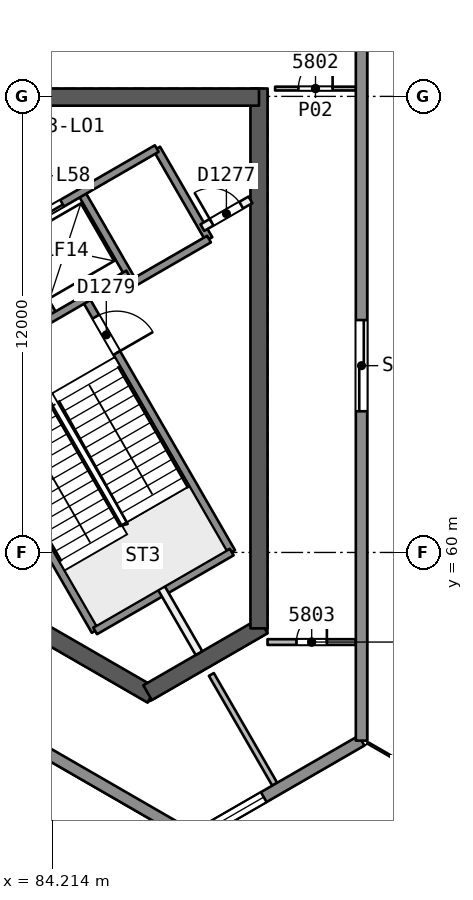
"""IFC4 building model, lengths in metres.
Left out: names, types, materials, properties, quantities, classifications, styles, units other than length and angle.
Written with IfcOpenShell. Run it as: python <this file> out.ifc"""

import sys

from ifc_helpers import new_model, si_unit, direction, frame, frame_2d, origin, origin_2d, place, context, subcontext, project, spatial, rectangle, extrude, element, fill, save


model = new_model("IFC4")
c1 = context("Model", 3, precision=1e-05, world=origin(), true_north=direction((0.0, 1.0)))
c2 = subcontext(c1, "Body", "Model", "MODEL_VIEW")
j1 = project(units=[si_unit("LENGTHUNIT", "METRE"), si_unit("PLANEANGLEUNIT", "RADIAN")], contexts=[c1])
p1 = place(None, origin())
s1 = spatial("IfcSite", under=j1, at=p1, CompositionType="ELEMENT")
p2 = place(p1, origin())
s2 = spatial("IfcBuilding", under=s1, at=p2, CompositionType="ELEMENT")
p3 = place(p2, frame((0.0, 0.0, 235.4)))
s3 = spatial("IfcBuildingStorey", under=s2, at=p3, CompositionType="ELEMENT", Elevation=235.4)
p4 = place(p3, frame((74.617, 63.299, 0.0), z_axis=(0.0, 0.0, 1.0), x_axis=(0.86602594008, -0.499999071108, 0.0)))
e1 = element("IfcWall", 1, at=p4, inside=s3, PredefinedType="SHEAR", context=c2, shape_type="SweptSolid", body=[
    extrude(rectangle(XDim=14.108, YDim=0.45, at=frame_2d((7.054, 0.0))), origin(), (0.0, 0.0, 1.0), 3.7),
])
p5 = place(p3, frame((86.723, 56.31, 0.0), z_axis=(0.0, 0.0, 1.0), x_axis=(0.866042179588, 0.49997094233, 0.0)))
e2 = element("IfcWall", 2, at=p5, inside=s3, PredefinedType="SHEAR", context=c2, shape_type="SweptSolid", body=[
    extrude(rectangle(XDim=3.515, YDim=0.45, at=frame_2d((1.758, 0.0))), origin(), (0.0, 0.0, 1.0), 3.7),
])
p6 = place(p3, frame((89.655, 58.002, 0.0), z_axis=(0.0, 0.0, 1.0), x_axis=(0.0, 1.0, 0.0)))
e3 = element("IfcWall", 3, at=p6, inside=s3, PredefinedType="SHEAR", context=c2, shape_type="SweptSolid", body=[
    extrude(rectangle(XDim=14.204, YDim=0.45, at=frame_2d((7.102, 0.0))), origin(), (0.0, 0.0, 1.0), 3.7),
])
p7 = place(p3, frame((89.655, 71.981, 0.0), z_axis=(0.0, 0.0, 1.0), x_axis=(-1.0, 0.0, 0.0)))
e4 = element("IfcWall", 4, at=p7, inside=s3, PredefinedType="SHEAR", context=c2, shape_type="SweptSolid", body=[
    extrude(rectangle(XDim=10.155, YDim=0.45, at=frame_2d((5.078, 0.0))), origin(), (0.0, 0.0, 1.0), 3.7),
])
p8 = place(p7, frame((8.005, 0.0, 0.0)))
e5 = element("IfcOpeningElement", 5, at=p8, cuts=e4, PredefinedType="OPENING", context=c2, shape_type="SweptSolid", body=[
    extrude(rectangle(XDim=1.2, YDim=2.1, at=frame_2d((0.6, 1.05))), frame((0.0, 0.235, 0.0), z_axis=(0.0, -1.0, 0.0), x_axis=(1.0, 0.0, 0.0)), (0.0, 0.0, 1.0), 0.471),
])
p9 = place(p3, frame((91.418, 51.564, 0.0), z_axis=(-0.017605841609, 0.030529980019, 0.999378784376), x_axis=(0.499244314507, -0.86574422845, 0.035242663615)))
e6 = element("IfcColumn", 6, at=p9, inside=s3, PredefinedType="COLUMN", context=c2, shape_type="SweptSolid", body=[
    extrude(rectangle(XDim=1.9, YDim=1.9, at=origin_2d()), origin(), (0.0, 0.0, 1.0), 3.702),
])
p10 = place(p3, frame((90.079, 72.206, 0.0), z_axis=(0.0, 0.0, 1.0), x_axis=(1.0, 0.0, 0.0)))
e7 = element("IfcWall", 7, at=p10, inside=s3, PredefinedType="PARTITIONING", context=c2, shape_type="SweptSolid", body=[
    extrude(rectangle(XDim=2.125, YDim=0.1, at=frame_2d((1.062, 0.0))), origin(), (0.0, 0.0, 1.0), 3.3),
])
p11 = place(p10, frame((0.613, 0.0, 0.0)))
e8 = element("IfcOpeningElement", 8, at=p11, cuts=e7, PredefinedType="OPENING", context=c2, shape_type="SweptSolid", body=[
    extrude(rectangle(XDim=0.9, YDim=2.1, at=frame_2d((0.45, 1.05))), frame((0.0, 0.061, 0.0), z_axis=(0.0, -1.0, 0.0), x_axis=(1.0, 0.0, 0.0)), (0.0, 0.0, 1.0), 0.121),
])
p12 = place(p3, frame((89.879, 57.642, 0.0), z_axis=(0.0, 0.0, 1.0), x_axis=(1.0, 0.0, 0.0)))
e9 = element("IfcWall", 9, at=p12, inside=s3, PredefinedType="PARTITIONING", context=c2, shape_type="SweptSolid", body=[
    extrude(rectangle(XDim=2.325, YDim=0.15, at=frame_2d((1.162, 0.0))), origin(), (0.0, 0.0, 1.0), 3.3),
])
p13 = place(p12, frame((0.762, 0.0, 0.0)))
e10 = element("IfcOpeningElement", 10, at=p13, cuts=e9, PredefinedType="OPENING", context=c2, shape_type="SweptSolid", body=[
    extrude(rectangle(XDim=0.8, YDim=2.1, at=frame_2d((0.4, 1.05))), frame((0.0, 0.085, 0.0), z_axis=(0.0, -1.0, 0.0), x_axis=(1.0, 0.0, 0.0)), (0.0, 0.0, 1.0), 0.171),
])
p14 = place(p3, frame((88.402, 56.789, 0.0), z_axis=(0.0, 0.0, 1.0), x_axis=(0.500005547131, -0.866022201123, 0.0)))
e11 = element("IfcWall", 11, at=p14, inside=s3, PredefinedType="PARTITIONING", context=c2, shape_type="SweptSolid", body=[
    extrude(rectangle(XDim=3.334, YDim=0.15, at=frame_2d((1.667, 0.0))), origin(), (0.0, 0.0, 1.0), 3.3),
])
p15 = place(p3, frame((92.353, 55.048, 0.0), z_axis=(0.0, 0.0, 1.0), x_axis=(-0.866030291356, -0.499991534382, 0.0)))
e12 = element("IfcWall", 12, at=p15, inside=s3, PredefinedType="SOLIDWALL", context=c2, shape_type="SweptSolid", body=[
    extrude(rectangle(XDim=5.105, YDim=0.3, at=frame_2d((2.552, 0.0))), origin(), (0.0, 0.0, 1.0), 3.3),
])
p16 = place(p15, frame((2.972, 0.0, 0.9)))
e13 = element("IfcOpeningElement", 13, at=p16, cuts=e12, PredefinedType="OPENING", context=c2, shape_type="SweptSolid", body=[
    extrude(rectangle(XDim=1.8, YDim=1.5, at=frame_2d((0.9, 0.75))), frame((0.0, 0.161, 0.0), z_axis=(0.0, -1.0, 0.0), x_axis=(1.0, 0.0, 0.0)), (0.0, 0.0, 1.0), 0.321),
])
p17 = place(p3, frame((92.353, 104.952, 0.0), z_axis=(0.0, 0.0, 1.0), x_axis=(0.0, -1.0, 0.0)))
e14 = element("IfcWall", 14, at=p17, inside=s3, PredefinedType="SOLIDWALL", context=c2, shape_type="SweptSolid", body=[
    extrude(rectangle(XDim=49.903, YDim=0.3, at=frame_2d((24.952, 0.0))), origin(), (0.0, 0.0, 1.0), 3.3),
])
p18 = place(p17, frame((28.896, 0.0, 0.0)))
e15 = element("IfcOpeningElement", 15, at=p18, cuts=e14, PredefinedType="OPENING", context=c2, shape_type="SweptSolid", body=[
    extrude(rectangle(XDim=2.4, YDim=2.4, at=frame_2d((1.2, 1.2))), frame((0.0, 0.161, 0.0), z_axis=(0.0, -1.0, 0.0), x_axis=(1.0, 0.0, 0.0)), (0.0, 0.0, 1.0), 0.321),
])
p19 = place(p17, frame((38.836, 0.0, 0.0)))
e16 = element("IfcOpeningElement", 16, at=p19, cuts=e14, PredefinedType="OPENING", context=c2, shape_type="SweptSolid", body=[
    extrude(rectangle(XDim=2.4, YDim=2.4, at=frame_2d((1.2, 1.2))), frame((0.0, 0.161, 0.0), z_axis=(0.0, -1.0, 0.0), x_axis=(1.0, 0.0, 0.0)), (0.0, 0.0, 1.0), 0.321),
])
p20 = place(p17, frame((9.518, 0.0, 0.0)))
e17 = element("IfcOpeningElement", 17, at=p20, cuts=e14, PredefinedType="OPENING", context=c2, shape_type="SweptSolid", body=[
    extrude(rectangle(XDim=2.4, YDim=2.4, at=frame_2d((1.2, 1.2))), frame((0.0, 0.161, 0.0), z_axis=(0.0, -1.0, 0.0), x_axis=(1.0, 0.0, 0.0)), (0.0, 0.0, 1.0), 0.321),
])
p21 = place(p17, frame((23.284, 0.0, 0.0)))
e18 = element("IfcOpeningElement", 18, at=p21, cuts=e14, PredefinedType="OPENING", context=c2, shape_type="SweptSolid", body=[
    extrude(rectangle(XDim=2.4, YDim=2.4, at=frame_2d((1.2, 1.2))), frame((0.0, 0.161, 0.0), z_axis=(0.0, -1.0, 0.0), x_axis=(1.0, 0.0, 0.0)), (0.0, 0.0, 1.0), 0.321),
])
p22 = place(p3, frame((87.932, 52.496, 0.0), z_axis=(0.0, 0.0, 1.0), x_axis=(-0.866025334516, 0.500000119977, 0.0)))
e19 = element("IfcWall", 19, at=p22, inside=s3, PredefinedType="SOLIDWALL", context=c2, shape_type="SweptSolid", body=[
    extrude(rectangle(XDim=49.903, YDim=0.3, at=frame_2d((24.952, 0.0))), origin(), (0.0, 0.0, 1.0), 3.3),
])
p23 = place(p22, frame((23.907, 0.0, 0.0)))
e20 = element("IfcOpeningElement", 20, at=p23, cuts=e19, PredefinedType="OPENING", context=c2, shape_type="SweptSolid", body=[
    extrude(rectangle(XDim=2.4, YDim=2.4, at=frame_2d((1.2, 1.2))), frame((0.0, 0.161, 0.0), z_axis=(0.0, -1.0, 0.0), x_axis=(1.0, 0.0, 0.0)), (0.0, 0.0, 1.0), 0.321),
])
p24 = place(p22, frame((37.985, 0.0, 0.0)))
e21 = element("IfcOpeningElement", 21, at=p24, cuts=e19, PredefinedType="OPENING", context=c2, shape_type="SweptSolid", body=[
    extrude(rectangle(XDim=2.4, YDim=2.4, at=frame_2d((1.2, 1.2))), frame((0.0, 0.161, 0.0), z_axis=(0.0, -1.0, 0.0), x_axis=(1.0, 0.0, 0.0)), (0.0, 0.0, 1.0), 0.321),
])
p25 = place(p22, frame((9.674, 0.0, 0.0)))
e22 = element("IfcOpeningElement", 22, at=p25, cuts=e19, PredefinedType="OPENING", context=c2, shape_type="SweptSolid", body=[
    extrude(rectangle(XDim=2.4, YDim=2.4, at=frame_2d((1.2, 1.2))), frame((0.0, 0.161, 0.0), z_axis=(0.0, -1.0, 0.0), x_axis=(1.0, 0.0, 0.0)), (0.0, 0.0, 1.0), 0.321),
])
p26 = place(p3, frame((81.493, 64.604, 0.0), z_axis=(0.0, 0.0, 1.0), x_axis=(0.500006057782, -0.866021906294, 0.0)))
e23 = element("IfcWall", 23, at=p26, inside=s3, PredefinedType="SOLIDWALL", context=c2, shape_type="SweptSolid", body=[
    extrude(rectangle(XDim=7.7, YDim=0.2, at=frame_2d((3.85, 0.0))), origin(), (0.0, 0.0, 1.0), 3.3),
])
p27 = place(p3, frame((87.09, 59.06, 0.0), z_axis=(0.0, 0.0, 1.0), x_axis=(0.500011643316, -0.866018681408, 0.0)))
e24 = element("IfcWall", 24, at=p27, inside=s3, PredefinedType="PARTITIONING", context=c2, shape_type="SweptSolid", body=[
    extrude(rectangle(XDim=1.973, YDim=0.2, at=frame_2d((0.987, 0.0))), origin(), (0.0, 0.0, 1.0), 3.3),
])
p28 = place(p3, frame((83.024, 68.352, 0.0), z_axis=(0.0, 0.0, 1.0), x_axis=(0.50000366821, -0.866023285932, 0.0)))
e25 = element("IfcWall", 25, at=p28, inside=s3, PredefinedType="SOLIDWALL", context=c2, shape_type="SweptSolid", body=[
    extrude(rectangle(XDim=2.48, YDim=0.2, at=frame_2d((1.24, 0.0))), origin(), (0.0, 0.0, 1.0), 3.3),
])
p29 = place(p3, frame((85.087, 66.679, 0.0), z_axis=(0.0, 0.0, 1.0), x_axis=(0.500019787375, -0.866013979237, 0.0)))
e26 = element("IfcWall", 26, at=p29, inside=s3, PredefinedType="SOLIDWALL", context=c2, shape_type="SweptSolid", body=[
    extrude(rectangle(XDim=7.7, YDim=0.2, at=frame_2d((3.85, 0.0))), origin(), (0.0, 0.0, 1.0), 3.3),
])
p30 = place(p29, frame((0.55, 0.0, 0.0)))
e27 = element("IfcOpeningElement", 27, at=p30, cuts=e26, PredefinedType="OPENING", context=c2, shape_type="SweptSolid", body=[
    extrude(rectangle(XDim=1.1, YDim=2.1, at=frame_2d((0.55, 1.05))), frame((0.0, 0.11, 0.0), z_axis=(0.0, -1.0, 0.0), x_axis=(1.0, 0.0, 0.0)), (0.0, 0.0, 1.0), 0.221),
])
for number, where, z_axis, x_axis in (
    (28, (84.973, 69.477, 0.0), (0.0, 0.0, 1.0), (0.5, -0.866, 0.0)),
    (29, (86.965, 70.626, 0.0), (0.0, 0.0, 1.0), (0.5, -0.866, 0.0)),
):
    element("IfcWall", number, at=place(p3, frame(where, z_axis=z_axis, x_axis=x_axis)), inside=s3, PredefinedType="SOLIDWALL", context=c2, shape_type="SweptSolid", body=[
        extrude(rectangle(XDim=2.75, YDim=0.2, at=frame_2d((1.375, 0.0))), origin(), (0.0, 0.0, 1.0), 3.3),
    ])
p31 = place(p3, frame((77.135, 64.952, 0.0), z_axis=(0.0, 0.0, 1.0), x_axis=(0.866031916153, 0.499988720078, 0.0)))
e30 = element("IfcWall", 30, at=p31, inside=s3, PredefinedType="SOLIDWALL", context=c2, shape_type="SweptSolid", body=[
    extrude(rectangle(XDim=11.35, YDim=0.2, at=frame_2d((5.675, 0.0))), origin(), (0.0, 0.0, 1.0), 3.3),
])
p32 = place(p31, frame((2.875, 0.0, 0.0)))
e31 = element("IfcOpeningElement", 31, at=p32, cuts=e30, PredefinedType="OPENING", context=c2, shape_type="SweptSolid", body=[
    extrude(rectangle(XDim=1.1, YDim=2.1, at=frame_2d((0.55, 1.05))), frame((0.0, 0.11, 0.0), z_axis=(0.0, -1.0, 0.0), x_axis=(1.0, 0.0, 0.0)), (0.0, 0.0, 1.0), 0.221),
])
p33 = place(p31, frame((5.125, 0.0, 0.0)))
e32 = element("IfcOpeningElement", 32, at=p33, cuts=e30, PredefinedType="OPENING", context=c2, shape_type="SweptSolid", body=[
    extrude(rectangle(XDim=1.1, YDim=2.1, at=frame_2d((0.55, 1.05))), frame((0.0, 0.11, 0.0), z_axis=(0.0, -1.0, 0.0), x_axis=(1.0, 0.0, 0.0)), (0.0, 0.0, 1.0), 0.221),
])
p34 = place(p31, frame((7.375, 0.0, 0.0)))
e33 = element("IfcOpeningElement", 33, at=p34, cuts=e30, PredefinedType="OPENING", context=c2, shape_type="SweptSolid", body=[
    extrude(rectangle(XDim=1.1, YDim=2.1, at=frame_2d((0.55, 1.05))), frame((0.0, 0.11, 0.0), z_axis=(0.0, -1.0, 0.0), x_axis=(1.0, 0.0, 0.0)), (0.0, 0.0, 1.0), 0.221),
])
p35 = place(p3, frame((88.165, 68.548, 0.0), z_axis=(0.0, 0.0, 1.0), x_axis=(0.866013036001, 0.500021421018, 0.0)))
e34 = element("IfcWall", 34, at=p35, inside=s3, PredefinedType="PARTITIONING", context=c2, shape_type="SweptSolid", body=[
    extrude(rectangle(XDim=1.461, YDim=0.2, at=frame_2d((0.73, 0.0))), origin(), (0.0, 0.0, 1.0), 3.3),
])
p36 = place(p35, frame((0.281, 0.0, 0.0)))
e35 = element("IfcOpeningElement", 35, at=p36, cuts=e34, PredefinedType="OPENING", context=c2, shape_type="SweptSolid", body=[
    extrude(rectangle(XDim=0.9, YDim=2.1, at=frame_2d((0.45, 1.05))), frame((0.0, 0.11, 0.0), z_axis=(0.0, -1.0, 0.0), x_axis=(1.0, 0.0, 0.0)), (0.0, 0.0, 1.0), 0.221),
])
p37 = place(p3, frame((80.367, 63.954, 0.0), z_axis=(0.0, 0.0, 1.0), x_axis=(0.866026575979, 0.499997969693, 0.0)))
e36 = element("IfcWall", 36, at=p37, inside=s3, PredefinedType="SOLIDWALL", context=c2, shape_type="SweptSolid", body=[
    extrude(rectangle(XDim=6.75, YDim=0.2, at=frame_2d((3.375, 0.0))), origin(), (0.0, 0.0, 1.0), 3.3),
])
p38 = place(p3, frame((86.348, 67.095, 0.0), z_axis=(0.0, 0.0, 1.0), x_axis=(0.86602648383, 0.499998129301, 0.0)))
e37 = element("IfcWall", 37, at=p38, inside=s3, PredefinedType="SOLIDWALL", context=c2, shape_type="SweptSolid", body=[
    extrude(rectangle(XDim=2.3, YDim=0.2, at=frame_2d((1.15, 0.0))), origin(), (0.0, 0.0, 1.0), 3.3),
])
p39 = place(p3, frame((85.343, 57.935, 0.0), z_axis=(0.0, 0.0, 1.0), x_axis=(0.866004344652, 0.500036473714, 0.0)))
e38 = element("IfcWall", 38, at=p39, inside=s3, PredefinedType="SOLIDWALL", context=c2, shape_type="SweptSolid", body=[
    extrude(rectangle(XDim=4.15, YDim=0.2, at=frame_2d((2.075, 0.0))), origin(), (0.0, 0.0, 1.0), 3.3),
])
p40 = place(p11, origin())
e39 = element("IfcDoor", 39, at=p40, inside=s3, OperationType="SINGLE_SWING_RIGHT", PredefinedType="NOTDEFINED", context=c2, shape_type="SweptSolid", body=[
    extrude(rectangle(XDim=0.9, YDim=2.1, at=frame_2d((0.45, 1.05))), frame((0.0, 0.025, 0.0), z_axis=(0.0, -1.0, 0.0), x_axis=(1.0, 0.0, 0.0)), (0.0, 0.0, 1.0), 0.05),
])
fill(e8, e39)
p41 = place(p13, origin())
e40 = element("IfcDoor", 40, at=p41, inside=s3, OperationType="SINGLE_SWING_RIGHT", PredefinedType="NOTDEFINED", context=c2, shape_type="SweptSolid", body=[
    extrude(rectangle(XDim=0.8, YDim=2.1, at=frame_2d((0.4, 1.05))), frame((0.0, 0.025, 0.0), z_axis=(0.0, -1.0, 0.0), x_axis=(1.0, 0.0, 0.0)), (0.0, 0.0, 1.0), 0.05),
])
fill(e10, e40)
p42 = place(p16, origin())
e41 = element("IfcWindow", 41, at=p42, inside=s3, PartitioningType="SINGLE_PANEL", PredefinedType="WINDOW", context=c2, shape_type="SweptSolid", body=[
    extrude(rectangle(XDim=1.8, YDim=1.5, at=frame_2d((0.9, 0.75))), frame((0.0, 0.03, 0.0), z_axis=(0.0, -1.0, 0.0), x_axis=(1.0, 0.0, 0.0)), (0.0, 0.0, 1.0), 0.06),
])
fill(e13, e41)
p43 = place(p19, origin())
e42 = element("IfcDoor", 42, at=p43, inside=s3, OperationType="SLIDING_TO_RIGHT", PredefinedType="NOTDEFINED", context=c2, shape_type="SweptSolid", body=[
    extrude(rectangle(XDim=2.4, YDim=2.4, at=frame_2d((1.2, 1.2))), frame((0.0, 0.025, 0.0), z_axis=(0.0, -1.0, 0.0), x_axis=(1.0, 0.0, 0.0)), (0.0, 0.0, 1.0), 0.05),
])
fill(e16, e42)
p44 = place(p34, origin())
e43 = element("IfcDoor", 43, at=p44, inside=s3, OperationType="SLIDING_TO_LEFT", PredefinedType="NOTDEFINED", context=c2, shape_type="SweptSolid", body=[
    extrude(rectangle(XDim=1.1, YDim=2.1, at=frame_2d((0.55, 1.05))), frame((0.0, 0.025, 0.0), z_axis=(0.0, -1.0, 0.0), x_axis=(1.0, 0.0, 0.0)), (0.0, 0.0, 1.0), 0.05),
])
fill(e33, e43)
p45 = place(p36, origin())
e44 = element("IfcDoor", 44, at=p45, inside=s3, OperationType="SINGLE_SWING_LEFT", PredefinedType="NOTDEFINED", context=c2, shape_type="SweptSolid", body=[
    extrude(rectangle(XDim=0.9, YDim=2.1, at=frame_2d((0.45, 1.05))), frame((0.0, 0.025, 0.0), z_axis=(0.0, -1.0, 0.0), x_axis=(1.0, 0.0, 0.0)), (0.0, 0.0, 1.0), 0.05),
])
fill(e35, e44)
p46 = place(p30, origin())
e45 = element("IfcDoor", 45, at=p46, inside=s3, OperationType="SINGLE_SWING_RIGHT", PredefinedType="NOTDEFINED", context=c2, shape_type="SweptSolid", body=[
    extrude(rectangle(XDim=1.1, YDim=2.1, at=frame_2d((0.55, 1.05))), frame((0.0, 0.025, 0.0), z_axis=(0.0, -1.0, 0.0), x_axis=(1.0, 0.0, 0.0)), (0.0, 0.0, 1.0), 0.05),
])
fill(e27, e45)
save(model, sys.argv[1])
